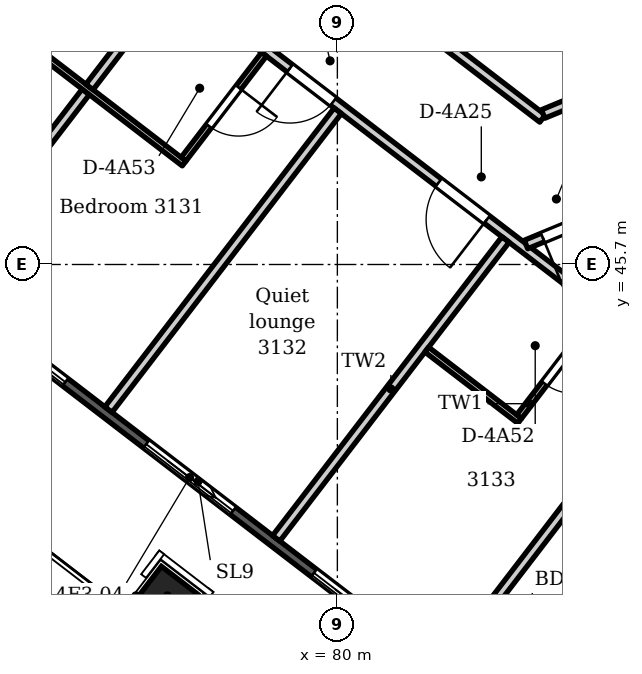
"""IFC4 building model, lengths in metres.
Left out: names, types, materials, properties, quantities, classifications, styles, units other than length and angle.
Written with IfcOpenShell. Run it as: python <this file> out.ifc"""

import sys

from ifc_helpers import new_model, si_unit, direction, frame, frame_2d, origin, origin_2d, place, context, subcontext, project, spatial, polyline, rectangle, outline, extrude, element, fill, save


model = new_model("IFC4")
c1 = context("Model", 3, precision=1e-05, world=origin(), true_north=direction((0.0, 1.0)))
c2 = subcontext(c1, "Body", "Model", "MODEL_VIEW")
j1 = project(units=[si_unit("LENGTHUNIT", "METRE"), si_unit("PLANEANGLEUNIT", "RADIAN")], contexts=[c1])
p1 = place(None, origin())
s1 = spatial("IfcSite", under=j1, at=p1, CompositionType="ELEMENT")
p2 = place(p1, origin())
s2 = spatial("IfcBuilding", under=s1, at=p2, CompositionType="ELEMENT")
p3 = place(p2, frame((0.0, 0.0, 124.2)))
s3 = spatial("IfcBuildingStorey", under=s2, at=p3, CompositionType="ELEMENT", Elevation=124.2)
p4 = place(p3, frame((77.206, 40.25, -0.35), z_axis=(0.0, 0.0, 1.0), x_axis=(-0.793353340291, 0.608761429009, 0.0)))
e1 = element("IfcColumn", 1, at=p4, inside=s3, PredefinedType="COLUMN", context=c2, shape_type="SweptSolid", body=[
    extrude(rectangle(XDim=0.75, YDim=0.65, at=origin_2d()), origin(), (0.0, 0.0, 1.0), 3.95),
])
p5 = place(p3, frame((87.225, 34.786, 0.0), z_axis=(0.0, 0.0, 1.0), x_axis=(-0.793353605974, 0.608761082764, 0.0)))
e2 = element("IfcWall", 2, at=p5, inside=s3, PredefinedType="SOLIDWALL", context=c2, shape_type="SweptSolid", body=[
    extrude(outline(polyline([(0.149, 0.075), (0.149, -0.075), (45.057, -0.075), (45.057, 0.075), (0.149, 0.075)])), origin(), (0.0, 0.0, 1.0), 3.3),
])
p6 = place(p5, frame((1.239, 0.0, 0.0)))
e3 = element("IfcOpeningElement", 3, at=p6, cuts=e2, PredefinedType="OPENING", context=c2, shape_type="SweptSolid", body=[
    extrude(rectangle(XDim=1.8, YDim=2.6, at=frame_2d((0.9, 1.3))), frame((0.0, 0.085, 0.0), z_axis=(0.0, -1.0, 0.0), x_axis=(1.0, 0.0, 0.0)), (0.0, 0.0, 1.0), 0.17),
])
p7 = place(p5, frame((4.316, 0.0, 0.0)))
e4 = element("IfcOpeningElement", 4, at=p7, cuts=e2, PredefinedType="OPENING", context=c2, shape_type="SweptSolid", body=[
    extrude(rectangle(XDim=1.8, YDim=2.6, at=frame_2d((0.9, 1.3))), frame((0.0, 0.085, 0.0), z_axis=(0.0, -1.0, 0.0), x_axis=(1.0, 0.0, 0.0)), (0.0, 0.0, 1.0), 0.17),
])
p8 = place(p5, frame((7.793, 0.0, 0.0)))
e5 = element("IfcOpeningElement", 5, at=p8, cuts=e2, PredefinedType="OPENING", context=c2, shape_type="SweptSolid", body=[
    extrude(rectangle(XDim=1.8, YDim=2.6, at=frame_2d((0.9, 1.3))), frame((0.0, 0.085, 0.0), z_axis=(0.0, -1.0, 0.0), x_axis=(1.0, 0.0, 0.0)), (0.0, 0.0, 1.0), 0.17),
])
p9 = place(p5, frame((11.271, 0.0, 0.0)))
e6 = element("IfcOpeningElement", 6, at=p9, cuts=e2, PredefinedType="OPENING", context=c2, shape_type="SweptSolid", body=[
    extrude(rectangle(XDim=1.8, YDim=2.6, at=frame_2d((0.9, 1.3))), frame((0.0, 0.085, 0.0), z_axis=(0.0, -1.0, 0.0), x_axis=(1.0, 0.0, 0.0)), (0.0, 0.0, 1.0), 0.17),
])
p10 = place(p5, frame((14.748, 0.0, 0.0)))
e7 = element("IfcOpeningElement", 7, at=p10, cuts=e2, PredefinedType="OPENING", context=c2, shape_type="SweptSolid", body=[
    extrude(rectangle(XDim=1.8, YDim=2.6, at=frame_2d((0.9, 1.3))), frame((0.0, 0.085, 0.0), z_axis=(0.0, -1.0, 0.0), x_axis=(1.0, 0.0, 0.0)), (0.0, 0.0, 1.0), 0.17),
])
p11 = place(p5, frame((18.226, 0.0, 0.0)))
e8 = element("IfcOpeningElement", 8, at=p11, cuts=e2, PredefinedType="OPENING", context=c2, shape_type="SweptSolid", body=[
    extrude(rectangle(XDim=1.8, YDim=2.6, at=frame_2d((0.9, 1.3))), frame((0.0, 0.085, 0.0), z_axis=(0.0, -1.0, 0.0), x_axis=(1.0, 0.0, 0.0)), (0.0, 0.0, 1.0), 0.17),
])
p12 = place(p5, frame((21.703, 0.0, 0.0)))
e9 = element("IfcOpeningElement", 9, at=p12, cuts=e2, PredefinedType="OPENING", context=c2, shape_type="SweptSolid", body=[
    extrude(rectangle(XDim=1.8, YDim=2.6, at=frame_2d((0.9, 1.3))), frame((0.0, 0.085, 0.0), z_axis=(0.0, -1.0, 0.0), x_axis=(1.0, 0.0, 0.0)), (0.0, 0.0, 1.0), 0.17),
])
p13 = place(p5, frame((25.18, 0.0, 0.0)))
e10 = element("IfcOpeningElement", 10, at=p13, cuts=e2, PredefinedType="OPENING", context=c2, shape_type="SweptSolid", body=[
    extrude(rectangle(XDim=1.8, YDim=2.6, at=frame_2d((0.9, 1.3))), frame((0.0, 0.085, 0.0), z_axis=(0.0, -1.0, 0.0), x_axis=(1.0, 0.0, 0.0)), (0.0, 0.0, 1.0), 0.17),
])
p14 = place(p5, frame((28.658, 0.0, 0.0)))
e11 = element("IfcOpeningElement", 11, at=p14, cuts=e2, PredefinedType="OPENING", context=c2, shape_type="SweptSolid", body=[
    extrude(rectangle(XDim=1.8, YDim=2.6, at=frame_2d((0.9, 1.3))), frame((0.0, 0.085, 0.0), z_axis=(0.0, -1.0, 0.0), x_axis=(1.0, 0.0, 0.0)), (0.0, 0.0, 1.0), 0.17),
])
p15 = place(p5, frame((32.135, 0.0, 0.0)))
e12 = element("IfcOpeningElement", 12, at=p15, cuts=e2, PredefinedType="OPENING", context=c2, shape_type="SweptSolid", body=[
    extrude(rectangle(XDim=1.8, YDim=2.6, at=frame_2d((0.9, 1.3))), frame((0.0, 0.085, 0.0), z_axis=(0.0, -1.0, 0.0), x_axis=(1.0, 0.0, 0.0)), (0.0, 0.0, 1.0), 0.17),
])
p16 = place(p5, frame((35.613, 0.0, 0.0)))
e13 = element("IfcOpeningElement", 13, at=p16, cuts=e2, PredefinedType="OPENING", context=c2, shape_type="SweptSolid", body=[
    extrude(rectangle(XDim=1.8, YDim=2.6, at=frame_2d((0.9, 1.3))), frame((0.0, 0.085, 0.0), z_axis=(0.0, -1.0, 0.0), x_axis=(1.0, 0.0, 0.0)), (0.0, 0.0, 1.0), 0.17),
])
p17 = place(p5, frame((39.09, 0.0, 0.0)))
e14 = element("IfcOpeningElement", 14, at=p17, cuts=e2, PredefinedType="OPENING", context=c2, shape_type="SweptSolid", body=[
    extrude(rectangle(XDim=1.8, YDim=2.6, at=frame_2d((0.9, 1.3))), frame((0.0, 0.085, 0.0), z_axis=(0.0, -1.0, 0.0), x_axis=(1.0, 0.0, 0.0)), (0.0, 0.0, 1.0), 0.17),
])
p18 = place(p5, frame((42.167, 0.0, 0.0)))
e15 = element("IfcOpeningElement", 15, at=p18, cuts=e2, PredefinedType="OPENING", context=c2, shape_type="SweptSolid", body=[
    extrude(rectangle(XDim=1.8, YDim=2.6, at=frame_2d((0.9, 1.3))), frame((0.0, 0.085, 0.0), z_axis=(0.0, -1.0, 0.0), x_axis=(1.0, 0.0, 0.0)), (0.0, 0.0, 1.0), 0.17),
])
p19 = place(p3, origin())
e16 = element("IfcWall", 16, at=p19, inside=s3, PredefinedType="PARAPET", context=c2, shape_type="SweptSolid", body=[
    extrude(outline(polyline([(64.446, 49.285), (85.042, 27.956), (85.138, 28.289), (66.056, 48.049), (64.446, 49.285)])), origin(), (0.0, 0.0, 1.0), 1.1),
])
p20 = place(p3, frame((73.318, 53.454, 0.0), z_axis=(0.0, 0.0, 1.0), x_axis=(0.793337765411, -0.60878172605, 0.0)))
e17 = element("IfcWall", 17, at=p20, inside=s3, PredefinedType="PARTITIONING", context=c2, shape_type="SweptSolid", body=[
    extrude(rectangle(XDim=18.995, YDim=0.15, at=frame_2d((9.498, 0.0))), origin(), (0.0, 0.0, 1.0), 2.8),
])
p21 = place(p20, frame((14.393, 0.0, 0.0)))
e18 = element("IfcOpeningElement", 18, at=p21, cuts=e17, PredefinedType="OPENING", context=c2, shape_type="SweptSolid", body=[
    extrude(rectangle(XDim=0.9, YDim=2.1, at=frame_2d((0.45, 1.05))), frame((0.0, 0.085, 0.0), z_axis=(0.0, -1.0, 0.0), x_axis=(1.0, 0.0, 0.0)), (0.0, 0.0, 1.0), 0.17),
])
p22 = place(p20, frame((10.523, 0.0, 0.0)))
e19 = element("IfcOpeningElement", 19, at=p22, cuts=e17, PredefinedType="OPENING", context=c2, shape_type="SweptSolid", body=[
    extrude(rectangle(XDim=1.0, YDim=2.1, at=frame_2d((0.5, 1.05))), frame((0.0, 0.085, 0.0), z_axis=(0.0, -1.0, 0.0), x_axis=(1.0, 0.0, 0.0)), (0.0, 0.0, 1.0), 0.17),
])
p23 = place(p20, frame((7.438, 0.0, 0.0)))
e20 = element("IfcOpeningElement", 20, at=p23, cuts=e17, PredefinedType="OPENING", context=c2, shape_type="SweptSolid", body=[
    extrude(rectangle(XDim=0.9, YDim=2.1, at=frame_2d((0.45, 1.05))), frame((0.0, 0.085, 0.0), z_axis=(0.0, -1.0, 0.0), x_axis=(1.0, 0.0, 0.0)), (0.0, 0.0, 1.0), 0.17),
])
p24 = place(p20, frame((1.683, 0.0, 0.0)))
e21 = element("IfcOpeningElement", 21, at=p24, cuts=e17, PredefinedType="OPENING", context=c2, shape_type="SweptSolid", body=[
    extrude(rectangle(XDim=0.9, YDim=2.1, at=frame_2d((0.45, 1.05))), frame((0.0, 0.085, 0.0), z_axis=(0.0, -1.0, 0.0), x_axis=(1.0, 0.0, 0.0)), (0.0, 0.0, 1.0), 0.17),
])
p25 = place(p20, frame((0.483, 0.0, 0.0)))
e22 = element("IfcOpeningElement", 22, at=p25, cuts=e17, PredefinedType="OPENING", context=c2, shape_type="SweptSolid", body=[
    extrude(rectangle(XDim=0.9, YDim=2.1, at=frame_2d((0.45, 1.05))), frame((0.0, 0.085, 0.0), z_axis=(0.0, -1.0, 0.0), x_axis=(1.0, 0.0, 0.0)), (0.0, 0.0, 1.0), 0.17),
])
p26 = place(p3, frame((73.476, 45.431, 0.0), z_axis=(0.0, 0.0, 1.0), x_axis=(0.608903577747, 0.793244245493, 0.0)))
e23 = element("IfcWall", 23, at=p26, inside=s3, PredefinedType="PARTITIONING", context=c2, shape_type="SweptSolid", body=[
    extrude(rectangle(XDim=3.919, YDim=0.15, at=frame_2d((1.959, 0.0))), origin(), (0.0, 0.0, 1.0), 3.3),
])
p27 = place(p3, frame((74.386, 49.736, 0.0), z_axis=(0.0, 0.0, 1.0), x_axis=(0.793363466367, -0.608748232222, 0.0)))
e24 = element("IfcWall", 24, at=p27, inside=s3, PredefinedType="PARTITIONING", context=c2, shape_type="SweptSolid", body=[
    extrude(rectangle(XDim=3.9, YDim=0.1, at=frame_2d((1.95, 0.0))), origin(), (0.0, 0.0, 1.0), 3.3),
])
p28 = place(p3, frame((75.923, 48.619, 0.0), z_axis=(0.0, 0.0, 1.0), x_axis=(0.608674216197, 0.79342025342, 0.0)))
e25 = element("IfcWall", 25, at=p28, inside=s3, PredefinedType="PARTITIONING", context=c2, shape_type="SweptSolid", body=[
    extrude(rectangle(XDim=2.175, YDim=0.15, at=frame_2d((1.088, 0.0))), origin(), (0.0, 0.0, 1.0), 3.3),
])
p29 = place(p3, frame((76.235, 43.314, 0.0), z_axis=(0.0, 0.0, 1.0), x_axis=(0.608811285709, 0.79331508141, 0.0)))
e26 = element("IfcWall", 26, at=p29, inside=s3, PredefinedType="PARTITIONING", context=c2, shape_type="SweptSolid", body=[
    extrude(rectangle(XDim=6.194, YDim=0.15, at=frame_2d((3.097, 0.0))), origin(), (0.0, 0.0, 1.0), 3.3),
])
p30 = place(p3, frame((77.47, 47.432, 0.0), z_axis=(0.0, 0.0, 1.0), x_axis=(0.608674216197, 0.79342025342, 0.0)))
e27 = element("IfcWall", 27, at=p30, inside=s3, PredefinedType="PARTITIONING", context=c2, shape_type="SweptSolid", body=[
    extrude(rectangle(XDim=2.175, YDim=0.1, at=frame_2d((1.088, 0.0))), origin(), (0.0, 0.0, 1.0), 3.3),
])
p31 = place(p30, frame((0.688, 0.0, 0.0)))
e28 = element("IfcOpeningElement", 28, at=p31, cuts=e27, PredefinedType="OPENING", context=c2, shape_type="SweptSolid", body=[
    extrude(rectangle(XDim=0.8, YDim=2.1, at=frame_2d((0.4, 1.05))), frame((0.0, 0.06, 0.0), z_axis=(0.0, -1.0, 0.0), x_axis=(1.0, 0.0, 0.0)), (0.0, 0.0, 1.0), 0.12),
])
p32 = place(p3, frame((78.994, 41.197, 0.0), z_axis=(0.0, 0.0, 1.0), x_axis=(0.608811285709, 0.79331508141, 0.0)))
e29 = element("IfcWall", 29, at=p32, inside=s3, PredefinedType="PARTITIONING", context=c2, shape_type="SweptSolid", body=[
    extrude(rectangle(XDim=6.194, YDim=0.15, at=frame_2d((3.097, 0.0))), origin(), (0.0, 0.0, 1.0), 3.3),
])
p33 = place(p3, frame((79.138, 51.352, 0.0), z_axis=(0.0, 0.0, 1.0), x_axis=(0.793274409151, -0.608864280268, 0.0)))
e30 = element("IfcWall", 30, at=p33, inside=s3, PredefinedType="PARTITIONING", context=c2, shape_type="SweptSolid", body=[
    extrude(rectangle(XDim=5.341, YDim=0.15, at=frame_2d((2.67, 0.0))), origin(), (0.0, 0.0, 1.0), 3.3),
])
p34 = place(p3, frame((81.47, 44.3, 0.0), z_axis=(0.0, 0.0, 1.0), x_axis=(0.793132716202, -0.609048844092, 0.0)))
e31 = element("IfcWall", 31, at=p34, inside=s3, PredefinedType="PARTITIONING", context=c2, shape_type="SweptSolid", body=[
    extrude(rectangle(XDim=1.926, YDim=0.1, at=frame_2d((0.963, 0.0))), origin(), (0.0, 0.0, 1.0), 3.3),
])
p35 = place(p3, frame((81.753, 39.08, 0.0), z_axis=(0.0, 0.0, 1.0), x_axis=(0.608586492439, 0.793487543204, 0.0)))
e32 = element("IfcWall", 32, at=p35, inside=s3, PredefinedType="PARTITIONING", context=c2, shape_type="SweptSolid", body=[
    extrude(rectangle(XDim=3.969, YDim=0.15, at=frame_2d((1.984, 0.0))), origin(), (0.0, 0.0, 1.0), 3.3),
])
p36 = place(p3, frame((82.988, 43.198, 0.0), z_axis=(0.0, 0.0, 1.0), x_axis=(0.608744865415, 0.793366049709, 0.0)))
e33 = element("IfcWall", 33, at=p36, inside=s3, PredefinedType="PARTITIONING", context=c2, shape_type="SweptSolid", body=[
    extrude(rectangle(XDim=2.175, YDim=0.1, at=frame_2d((1.088, 0.0))), origin(), (0.0, 0.0, 1.0), 3.3),
])
p37 = place(p36, frame((0.688, 0.0, 0.0)))
e34 = element("IfcOpeningElement", 34, at=p37, cuts=e33, PredefinedType="OPENING", context=c2, shape_type="SweptSolid", body=[
    extrude(rectangle(XDim=0.8, YDim=2.1, at=frame_2d((0.4, 1.05))), frame((0.0, 0.06, 0.0), z_axis=(0.0, -1.0, 0.0), x_axis=(1.0, 0.0, 0.0)), (0.0, 0.0, 1.0), 0.12),
])
p38 = place(p3, frame((83.102, 46.029, 0.0), z_axis=(0.0, 0.0, 1.0), x_axis=(0.923986937012, 0.382424031973, 0.0)))
e35 = element("IfcWall", 35, at=p38, inside=s3, PredefinedType="PARTITIONING", context=c2, shape_type="SweptSolid", body=[
    extrude(rectangle(XDim=2.09, YDim=0.15, at=frame_2d((1.045, 0.0))), origin(), (0.0, 0.0, 1.0), 3.3),
])
p39 = place(p38, frame((0.298, 0.0, 0.0)))
e36 = element("IfcOpeningElement", 36, at=p39, cuts=e35, PredefinedType="OPENING", context=c2, shape_type="SweptSolid", body=[
    extrude(rectangle(XDim=0.9, YDim=2.1, at=frame_2d((0.45, 1.05))), frame((0.0, 0.085, 0.0), z_axis=(0.0, -1.0, 0.0), x_axis=(1.0, 0.0, 0.0)), (0.0, 0.0, 1.0), 0.17),
])
p40 = place(p3, frame((83.384, 48.175, 0.0), z_axis=(0.0, 0.0, 1.0), x_axis=(0.923876009177, 0.382691938335, 0.0)))
e37 = element("IfcWall", 37, at=p40, inside=s3, PredefinedType="PARTITIONING", context=c2, shape_type="SweptSolid", body=[
    extrude(rectangle(XDim=4.86, YDim=0.15, at=frame_2d((2.43, 0.0))), origin(), (0.0, 0.0, 1.0), 2.7),
])
p41 = place(p8, origin())
e38 = element("IfcDoor", 38, at=p41, inside=s3, OperationType="SLIDING_TO_LEFT", PredefinedType="DOOR", context=c2, shape_type="SweptSolid", body=[
    extrude(rectangle(XDim=1.8, YDim=2.6, at=frame_2d((0.9, 1.3))), frame((0.0, 0.025, 0.0), z_axis=(0.0, -1.0, 0.0), x_axis=(1.0, 0.0, 0.0)), (0.0, 0.0, 1.0), 0.05),
])
fill(e5, e38)
p42 = place(p9, origin())
e39 = element("IfcDoor", 39, at=p42, inside=s3, OperationType="SLIDING_TO_LEFT", PredefinedType="DOOR", context=c2, shape_type="SweptSolid", body=[
    extrude(rectangle(XDim=1.8, YDim=2.6, at=frame_2d((0.9, 1.3))), frame((0.0, 0.025, 0.0), z_axis=(0.0, -1.0, 0.0), x_axis=(1.0, 0.0, 0.0)), (0.0, 0.0, 1.0), 0.05),
])
fill(e6, e39)
p43 = place(p10, origin())
e40 = element("IfcDoor", 40, at=p43, inside=s3, OperationType="SLIDING_TO_LEFT", PredefinedType="DOOR", context=c2, shape_type="SweptSolid", body=[
    extrude(rectangle(XDim=1.8, YDim=2.6, at=frame_2d((0.9, 1.3))), frame((0.0, 0.025, 0.0), z_axis=(0.0, -1.0, 0.0), x_axis=(1.0, 0.0, 0.0)), (0.0, 0.0, 1.0), 0.05),
])
fill(e7, e40)
p44 = place(p39, frame((0.9, 0.0, 0.0), z_axis=(0.0, 0.0, 1.0), x_axis=(-1.0, 0.0, 0.0)))
e41 = element("IfcDoor", 41, at=p44, inside=s3, OperationType="SINGLE_SWING_RIGHT", PredefinedType="DOOR", context=c2, shape_type="SweptSolid", body=[
    extrude(rectangle(XDim=0.9, YDim=2.1, at=frame_2d((0.45, 1.05))), frame((0.0, 0.025, 0.0), z_axis=(0.0, -1.0, 0.0), x_axis=(1.0, 0.0, 0.0)), (0.0, 0.0, 1.0), 0.05),
])
fill(e36, e41)
p45 = place(p22, frame((1.0, 0.0, 0.0), z_axis=(0.0, 0.0, 1.0), x_axis=(-1.0, 0.0, 0.0)))
e42 = element("IfcDoor", 42, at=p45, inside=s3, OperationType="SINGLE_SWING_LEFT", PredefinedType="DOOR", context=c2, shape_type="SweptSolid", body=[
    extrude(rectangle(XDim=1.0, YDim=2.1, at=frame_2d((0.5, 1.05))), frame((0.0, 0.025, 0.0), z_axis=(0.0, -1.0, 0.0), x_axis=(1.0, 0.0, 0.0)), (0.0, 0.0, 1.0), 0.05),
])
fill(e19, e42)
p46 = place(p23, frame((0.9, 0.0, 0.0), z_axis=(0.0, 0.0, 1.0), x_axis=(-1.0, 0.0, 0.0)))
e43 = element("IfcDoor", 43, at=p46, inside=s3, OperationType="SINGLE_SWING_RIGHT", PredefinedType="DOOR", context=c2, shape_type="SweptSolid", body=[
    extrude(rectangle(XDim=0.9, YDim=2.1, at=frame_2d((0.45, 1.05))), frame((0.0, 0.025, 0.0), z_axis=(0.0, -1.0, 0.0), x_axis=(1.0, 0.0, 0.0)), (0.0, 0.0, 1.0), 0.05),
])
fill(e20, e43)
p47 = place(p37, frame((0.8, 0.0, 0.0), z_axis=(0.0, 0.0, 1.0), x_axis=(-1.0, 0.0, 0.0)))
e44 = element("IfcDoor", 44, at=p47, inside=s3, OperationType="SINGLE_SWING_LEFT", PredefinedType="DOOR", context=c2, shape_type="SweptSolid", body=[
    extrude(rectangle(XDim=0.8, YDim=2.1, at=frame_2d((0.4, 1.05))), frame((0.0, 0.025, 0.0), z_axis=(0.0, -1.0, 0.0), x_axis=(1.0, 0.0, 0.0)), (0.0, 0.0, 1.0), 0.05),
])
fill(e34, e44)
p48 = place(p31, frame((0.8, 0.0, 0.0), z_axis=(0.0, 0.0, 1.0), x_axis=(-1.0, 0.0, 0.0)))
e45 = element("IfcDoor", 45, at=p48, inside=s3, OperationType="SINGLE_SWING_LEFT", PredefinedType="DOOR", context=c2, shape_type="SweptSolid", body=[
    extrude(rectangle(XDim=0.8, YDim=2.1, at=frame_2d((0.4, 1.05))), frame((0.0, 0.025, 0.0), z_axis=(0.0, -1.0, 0.0), x_axis=(1.0, 0.0, 0.0)), (0.0, 0.0, 1.0), 0.05),
])
fill(e28, e45)
save(model, sys.argv[1])
